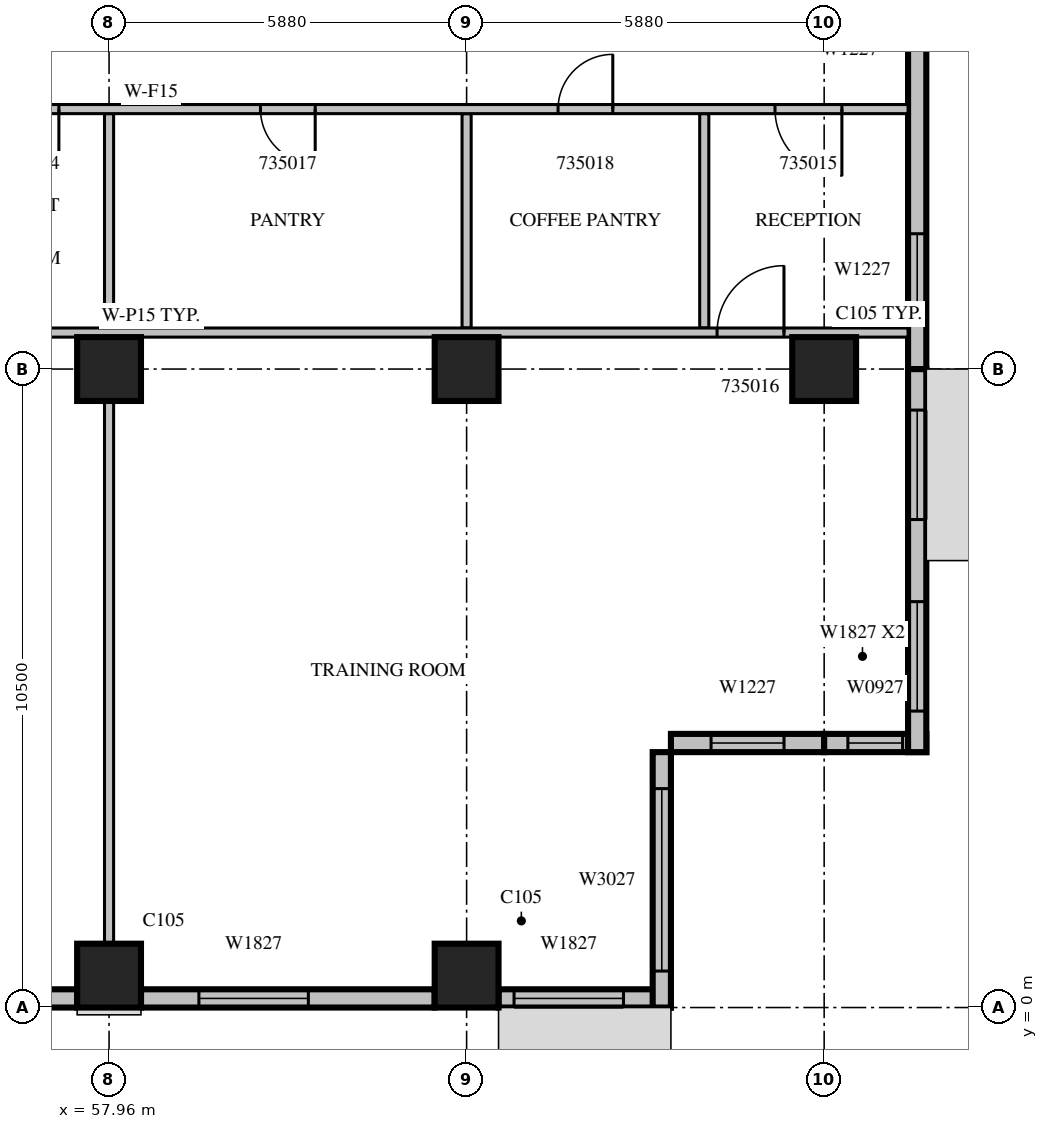
"""IFC4 building model, lengths in metres.
Left out: names, types, materials, properties, quantities, classifications, styles, units other than length and angle.
Written with IfcOpenShell. Run it as: python <this file> out.ifc"""

import sys

from ifc_helpers import new_model, si_unit, direction, frame, frame_2d, origin, origin_2d, place, context, subcontext, project, spatial, rectangle, extrude, source, transform, mapped, element, fill, save


model = new_model("IFC4")
c1 = context("Model", 3, precision=1e-05, world=origin(), true_north=direction((0.0, 1.0)))
c2 = subcontext(c1, "Body", "Model", "MODEL_VIEW")
j1 = project(units=[si_unit("LENGTHUNIT", "METRE"), si_unit("PLANEANGLEUNIT", "RADIAN")], contexts=[c1])
p1 = place(None, origin())
s1 = spatial("IfcSite", under=j1, at=p1, CompositionType="ELEMENT")
p2 = place(p1, origin())
s2 = spatial("IfcBuilding", under=s1, at=p2, CompositionType="ELEMENT")
p3 = place(p2, frame((0.0, 0.0, 158.1)))
s3 = spatial("IfcBuildingStorey", under=s2, at=p3, CompositionType="ELEMENT", Elevation=158.1)
m1 = source(origin(), c2, "Body", "SweptSolid", [
    extrude(rectangle(XDim=1.05, YDim=1.05, at=origin_2d()), origin(), (0.0, 0.0, 1.0), 4.2),
])
for number, where, z_axis, x_axis in (
    (1, (57.96, 0.525, 0.0), (0.0, 0.0, 1.0), (1.0, 0.0, 0.0)),
    (2, (63.84, 0.525, 0.0), (0.0, 0.0, 1.0), (1.0, 0.0, 0.0)),
    (3, (57.96, 10.5, 0.0), (0.0, 0.0, 1.0), (1.0, 0.0, 0.0)),
    (4, (63.84, 10.5, 0.0), (0.0, 0.0, 1.0), (1.0, 0.0, 0.0)),
    (5, (69.72, 10.5, 0.0), (0.0, 0.0, 1.0), (1.0, 0.0, 0.0)),
):
    element("IfcColumn", number, at=place(p3, frame(where, z_axis=z_axis, x_axis=x_axis)), inside=s3, PredefinedType="COLUMN", context=c2, shape_type="MappedRepresentation", body=[
        mapped(m1, transform((0.0, 0.0, 0.0), scale=1.0)),
    ])
m2 = source(origin(), c2, "Body", "SweptSolid", [
    extrude(rectangle(XDim=4.83, YDim=0.3, at=frame_2d((2.415, 0.0))), origin(), (0.0, 0.0, 1.0), 3.8),
])
p4 = place(p3, frame((52.605, 0.15, 0.0), z_axis=(0.0, 0.0, 1.0), x_axis=(1.0, 0.0, 0.0)))
e6 = element("IfcWall", 6, at=p4, inside=s3, PredefinedType="STANDARD", context=c2, shape_type="MappedRepresentation", body=[
    mapped(m2, transform((0.0, 0.0, 0.0), scale=1.0)),
])
m3 = source(origin(), c2, "Body", "SweptSolid", [
    extrude(rectangle(XDim=3.6, YDim=2.7, at=frame_2d((1.8, 1.35))), frame((0.0, 0.16, 0.0), z_axis=(0.0, -1.0, 0.0), x_axis=(1.0, 0.0, 0.0)), (0.0, 0.0, 1.0), 0.32),
])
p5 = place(p4, frame((0.615, 0.0, 0.6)))
e7 = element("IfcOpeningElement", 7, at=p5, cuts=e6, PredefinedType="OPENING", context=c2, shape_type="MappedRepresentation", body=[
    mapped(m3, transform((0.0, 0.0, 0.0), scale=1.0)),
])
p6 = place(p3, frame((58.485, 0.15, 0.0), z_axis=(0.0, 0.0, 1.0), x_axis=(1.0, 0.0, 0.0)))
e8 = element("IfcWall", 8, at=p6, inside=s3, PredefinedType="STANDARD", context=c2, shape_type="MappedRepresentation", body=[
    mapped(m2, transform((0.0, 0.0, 0.0), scale=1.0)),
])
m4 = source(origin(), c2, "Body", "SweptSolid", [
    extrude(rectangle(XDim=1.8, YDim=2.7, at=frame_2d((0.9, 1.35))), frame((0.0, 0.16, 0.0), z_axis=(0.0, -1.0, 0.0), x_axis=(1.0, 0.0, 0.0)), (0.0, 0.0, 1.0), 0.32),
])
p7 = place(p6, frame((0.953, 0.0, 0.6)))
e9 = element("IfcOpeningElement", 9, at=p7, cuts=e8, PredefinedType="OPENING", context=c2, shape_type="MappedRepresentation", body=[
    mapped(m4, transform((0.0, 0.0, 0.0), scale=1.0)),
])
m5 = source(origin(), c2, "Body", "SweptSolid", [
    extrude(rectangle(XDim=2.835, YDim=0.3, at=frame_2d((1.417, 0.0))), origin(), (0.0, 0.0, 1.0), 3.8),
])
p8 = place(p3, frame((64.365, 0.15, 0.0), z_axis=(0.0, 0.0, 1.0), x_axis=(1.0, 0.0, 0.0)))
e10 = element("IfcWall", 10, at=p8, inside=s3, PredefinedType="STANDARD", context=c2, shape_type="MappedRepresentation", body=[
    mapped(m5, transform((0.0, 0.0, 0.0), scale=1.0)),
])
p9 = place(p8, frame((0.255, 0.0, 0.6)))
e11 = element("IfcOpeningElement", 11, at=p9, cuts=e10, PredefinedType="OPENING", context=c2, shape_type="MappedRepresentation", body=[
    mapped(m4, transform((0.0, 0.0, 0.0), scale=1.0)),
])
m6 = source(origin(), c2, "Body", "SweptSolid", [
    extrude(rectangle(XDim=4.2, YDim=0.3, at=frame_2d((2.1, 0.0))), origin(), (0.0, 0.0, 1.0), 3.8),
])
p10 = place(p3, frame((67.05, 0.0, 0.0), z_axis=(0.0, 0.0, 1.0), x_axis=(0.0, 1.0, 0.0)))
e12 = element("IfcWall", 12, at=p10, inside=s3, PredefinedType="STANDARD", context=c2, shape_type="MappedRepresentation", body=[
    mapped(m6, transform((0.0, 0.0, 0.0), scale=1.0)),
])
m7 = source(origin(), c2, "Body", "SweptSolid", [
    extrude(rectangle(XDim=3.0, YDim=2.7, at=frame_2d((1.5, 1.35))), frame((0.0, 0.16, 0.0), z_axis=(0.0, -1.0, 0.0), x_axis=(1.0, 0.0, 0.0)), (0.0, 0.0, 1.0), 0.32),
])
p11 = place(p10, frame((0.6, 0.0, 0.6)))
e13 = element("IfcOpeningElement", 13, at=p11, cuts=e12, PredefinedType="OPENING", context=c2, shape_type="MappedRepresentation", body=[
    mapped(m7, transform((0.0, 0.0, 0.0), scale=1.0)),
])
m8 = source(origin(), c2, "Body", "SweptSolid", [
    extrude(rectangle(XDim=2.52, YDim=0.3, at=frame_2d((1.26, 0.0))), origin(), (0.0, 0.0, 1.0), 3.8),
])
p12 = place(p3, frame((67.2, 4.35, 0.0), z_axis=(0.0, 0.0, 1.0), x_axis=(1.0, 0.0, 0.0)))
e14 = element("IfcWall", 14, at=p12, inside=s3, PredefinedType="STANDARD", context=c2, shape_type="MappedRepresentation", body=[
    mapped(m8, transform((0.0, 0.0, 0.0), scale=1.0)),
])
m9 = source(origin(), c2, "Body", "SweptSolid", [
    extrude(rectangle(XDim=1.2, YDim=2.7, at=frame_2d((0.6, 1.35))), frame((0.0, 0.16, 0.0), z_axis=(0.0, -1.0, 0.0), x_axis=(1.0, 0.0, 0.0)), (0.0, 0.0, 1.0), 0.32),
])
p13 = place(p12, frame((0.66, 0.0, 0.6)))
e15 = element("IfcOpeningElement", 15, at=p13, cuts=e14, PredefinedType="OPENING", context=c2, shape_type="MappedRepresentation", body=[
    mapped(m9, transform((0.0, 0.0, 0.0), scale=1.0)),
])
m10 = source(origin(), c2, "Body", "SweptSolid", [
    extrude(rectangle(XDim=1.68, YDim=0.3, at=frame_2d((0.84, 0.0))), origin(), (0.0, 0.0, 1.0), 3.8),
])
p14 = place(p3, frame((69.72, 4.35, 0.0), z_axis=(0.0, 0.0, 1.0), x_axis=(1.0, 0.0, 0.0)))
e16 = element("IfcWall", 16, at=p14, inside=s3, PredefinedType="STANDARD", context=c2, shape_type="MappedRepresentation", body=[
    mapped(m10, transform((0.0, 0.0, 0.0), scale=1.0)),
])
m11 = source(origin(), c2, "Body", "SweptSolid", [
    extrude(rectangle(XDim=0.9, YDim=2.7, at=frame_2d((0.45, 1.35))), frame((0.0, 0.16, 0.0), z_axis=(0.0, -1.0, 0.0), x_axis=(1.0, 0.0, 0.0)), (0.0, 0.0, 1.0), 0.32),
])
p15 = place(p14, frame((0.39, 0.0, 0.6)))
e17 = element("IfcOpeningElement", 17, at=p15, cuts=e16, PredefinedType="OPENING", context=c2, shape_type="MappedRepresentation", body=[
    mapped(m11, transform((0.0, 0.0, 0.0), scale=1.0)),
])
m12 = source(origin(), c2, "Body", "SweptSolid", [
    extrude(rectangle(XDim=6.3, YDim=0.3, at=frame_2d((3.15, 0.0))), origin(), (0.0, 0.0, 1.0), 3.8),
])
p16 = place(p3, frame((71.25, 4.2, 0.0), z_axis=(0.0, 0.0, 1.0), x_axis=(0.0, 1.0, 0.0)))
e18 = element("IfcWall", 18, at=p16, inside=s3, PredefinedType="STANDARD", context=c2, shape_type="MappedRepresentation", body=[
    mapped(m12, transform((0.0, 0.0, 0.0), scale=1.0)),
])
p17 = place(p16, frame((0.675, 0.0, 0.6)))
e19 = element("IfcOpeningElement", 19, at=p17, cuts=e18, PredefinedType="OPENING", context=c2, shape_type="MappedRepresentation", body=[
    mapped(m4, transform((0.0, 0.0, 0.0), scale=1.0)),
])
p18 = place(p16, frame((3.825, 0.0, 0.6)))
e20 = element("IfcOpeningElement", 20, at=p18, cuts=e18, PredefinedType="OPENING", context=c2, shape_type="MappedRepresentation", body=[
    mapped(m4, transform((0.0, 0.0, 0.0), scale=1.0)),
])
p19 = place(p3, frame((71.25, 10.5, 0.0), z_axis=(0.0, 0.0, 1.0), x_axis=(0.0, 1.0, 0.0)))
e21 = element("IfcWall", 21, at=p19, inside=s3, PredefinedType="STANDARD", context=c2, shape_type="MappedRepresentation", body=[
    mapped(m12, transform((0.0, 0.0, 0.0), scale=1.0)),
])
p20 = place(p19, frame((1.025, 0.0, 0.6)))
e22 = element("IfcOpeningElement", 22, at=p20, cuts=e21, PredefinedType="OPENING", context=c2, shape_type="MappedRepresentation", body=[
    mapped(m9, transform((0.0, 0.0, 0.0), scale=1.0)),
])
m13 = source(origin(), c2, "Body", "SweptSolid", [
    extrude(rectangle(XDim=3.525, YDim=0.15, at=frame_2d((1.762, 0.0))), origin(), (0.0, 0.0, 1.0), 3.8),
])
for number, where, z_axis, x_axis in (
    (23, (63.84, 11.175, 0.0), (0.0, 0.0, 1.0), (0.0, 1.0, 0.0)),
    (24, (67.748, 11.175, 0.0), (0.0, 0.0, 1.0), (0.0, 1.0, 0.0)),
):
    element("IfcWall", number, at=place(p3, frame(where, z_axis=z_axis, x_axis=x_axis)), inside=s3, PredefinedType="PARTITIONING", context=c2, shape_type="MappedRepresentation", body=[
        mapped(m13, transform((0.0, 0.0, 0.0), scale=1.0)),
    ])
m14 = source(origin(), c2, "Body", "SweptSolid", [
    extrude(rectangle(XDim=8.927, YDim=0.15, at=frame_2d((4.463, 0.0))), origin(), (0.0, 0.0, 1.0), 3.8),
])
p21 = place(p3, frame((57.96, 1.049, 0.0), z_axis=(0.0, 0.0, 1.0), x_axis=(0.0, 1.0, 0.0)))
e25 = element("IfcWall", 25, at=p21, inside=s3, PredefinedType="PARTITIONING", context=c2, shape_type="MappedRepresentation", body=[
    mapped(m14, transform((0.0, 0.0, 0.0), scale=1.0)),
])
p22 = place(p3, frame((57.96, 11.175, 0.0), z_axis=(0.0, 0.0, 1.0), x_axis=(0.0, 1.0, 0.0)))
e26 = element("IfcWall", 26, at=p22, inside=s3, PredefinedType="PARTITIONING", context=c2, shape_type="MappedRepresentation", body=[
    mapped(m13, transform((0.0, 0.0, 0.0), scale=1.0)),
])
m15 = source(origin(), c2, "Body", "SweptSolid", [
    extrude(rectangle(XDim=24.9, YDim=0.15, at=frame_2d((12.45, 0.0))), origin(), (0.0, 0.0, 1.0), 3.8),
])
p23 = place(p3, frame((71.1, 11.1, 0.0), z_axis=(0.0, 0.0, 1.0), x_axis=(-1.0, 0.0, 0.0)))
e27 = element("IfcWall", 27, at=p23, inside=s3, PredefinedType="PARTITIONING", context=c2, shape_type="MappedRepresentation", body=[
    mapped(m15, transform((0.0, 0.0, 0.0), scale=1.0)),
])
m16 = source(origin(), c2, "Body", "SweptSolid", [
    extrude(rectangle(XDim=1.1, YDim=2.1, at=frame_2d((0.55, 1.05))), frame((0.0, 0.085, 0.0), z_axis=(0.0, -1.0, 0.0), x_axis=(1.0, 0.0, 0.0)), (0.0, 0.0, 1.0), 0.17),
])
p24 = place(p23, frame((22.451, 0.0, 0.0)))
e28 = element("IfcOpeningElement", 28, at=p24, cuts=e27, PredefinedType="OPENING", context=c2, shape_type="MappedRepresentation", body=[
    mapped(m16, transform((0.0, 0.0, 0.0), scale=1.0)),
])
p25 = place(p23, frame((2.041, 0.0, 0.0)))
e29 = element("IfcOpeningElement", 29, at=p25, cuts=e27, PredefinedType="OPENING", context=c2, shape_type="MappedRepresentation", body=[
    mapped(m16, transform((0.0, 0.0, 0.0), scale=1.0)),
])
p26 = place(p3, frame((71.1, 14.775, 0.0), z_axis=(0.0, 0.0, 1.0), x_axis=(-1.0, 0.0, 0.0)))
e30 = element("IfcWall", 30, at=p26, inside=s3, PredefinedType="PARTITIONING", context=c2, shape_type="MappedRepresentation", body=[
    mapped(m15, transform((0.0, 0.0, 0.0), scale=1.0)),
])
p27 = place(p26, frame((22.726, 0.0, 0.0)))
e31 = element("IfcOpeningElement", 31, at=p27, cuts=e30, PredefinedType="OPENING", context=c2, shape_type="MappedRepresentation", body=[
    mapped(m16, transform((0.0, 0.0, 0.0), scale=1.0)),
])
m17 = source(origin(), c2, "Body", "SweptSolid", [
    extrude(rectangle(XDim=0.9, YDim=2.1, at=frame_2d((0.45, 1.05))), frame((0.0, 0.085, 0.0), z_axis=(0.0, -1.0, 0.0), x_axis=(1.0, 0.0, 0.0)), (0.0, 0.0, 1.0), 0.17),
])
p28 = place(p26, frame((19.886, 0.0, 0.0)))
e32 = element("IfcOpeningElement", 32, at=p28, cuts=e30, PredefinedType="OPENING", context=c2, shape_type="MappedRepresentation", body=[
    mapped(m17, transform((0.0, 0.0, 0.0), scale=1.0)),
])
p29 = place(p26, frame((16.905, 0.0, 0.0)))
e33 = element("IfcOpeningElement", 33, at=p29, cuts=e30, PredefinedType="OPENING", context=c2, shape_type="MappedRepresentation", body=[
    mapped(m17, transform((0.0, 0.0, 0.0), scale=1.0)),
])
p30 = place(p26, frame((13.965, 0.0, 0.0)))
e34 = element("IfcOpeningElement", 34, at=p30, cuts=e30, PredefinedType="OPENING", context=c2, shape_type="MappedRepresentation", body=[
    mapped(m17, transform((0.0, 0.0, 0.0), scale=1.0)),
])
p31 = place(p26, frame((1.088, 0.0, 0.0)))
e35 = element("IfcOpeningElement", 35, at=p31, cuts=e30, PredefinedType="OPENING", context=c2, shape_type="MappedRepresentation", body=[
    mapped(m16, transform((0.0, 0.0, 0.0), scale=1.0)),
])
p32 = place(p26, frame((9.75, 0.0, 0.0)))
e36 = element("IfcOpeningElement", 36, at=p32, cuts=e30, PredefinedType="OPENING", context=c2, shape_type="MappedRepresentation", body=[
    mapped(m17, transform((0.0, 0.0, 0.0), scale=1.0)),
])
p33 = place(p26, frame((4.856, 0.0, 0.0)))
e37 = element("IfcOpeningElement", 37, at=p33, cuts=e30, PredefinedType="OPENING", context=c2, shape_type="MappedRepresentation", body=[
    mapped(m17, transform((0.0, 0.0, 0.0), scale=1.0)),
])
m18 = source(origin(), c2, "Body", "SweptSolid", [
    extrude(rectangle(XDim=1.8, YDim=2.7, at=frame_2d((0.9, 1.35))), frame((0.0, 0.03, 0.0), z_axis=(0.0, -1.0, 0.0), x_axis=(1.0, 0.0, 0.0)), (0.0, 0.0, 1.0), 0.06),
])
p34 = place(p7, origin())
e38 = element("IfcWindow", 38, at=p34, inside=s3, PartitioningType="SINGLE_PANEL", PredefinedType="WINDOW", context=c2, shape_type="MappedRepresentation", body=[
    mapped(m18, transform((0.0, 0.0, 0.0), scale=1.0)),
])
fill(e9, e38)
p35 = place(p9, origin())
e39 = element("IfcWindow", 39, at=p35, inside=s3, PartitioningType="SINGLE_PANEL", PredefinedType="WINDOW", context=c2, shape_type="MappedRepresentation", body=[
    mapped(m18, transform((0.0, 0.0, 0.0), scale=1.0)),
])
fill(e11, e39)
m19 = source(origin(), c2, "Body", "SweptSolid", [
    extrude(rectangle(XDim=3.0, YDim=2.7, at=frame_2d((1.5, 1.35))), frame((0.0, 0.03, 0.0), z_axis=(0.0, -1.0, 0.0), x_axis=(1.0, 0.0, 0.0)), (0.0, 0.0, 1.0), 0.06),
])
p36 = place(p11, origin())
e40 = element("IfcWindow", 40, at=p36, inside=s3, PartitioningType="SINGLE_PANEL", PredefinedType="WINDOW", context=c2, shape_type="MappedRepresentation", body=[
    mapped(m19, transform((0.0, 0.0, 0.0), scale=1.0)),
])
fill(e13, e40)
m20 = source(origin(), c2, "Body", "SweptSolid", [
    extrude(rectangle(XDim=1.2, YDim=2.7, at=frame_2d((0.6, 1.35))), frame((0.0, 0.03, 0.0), z_axis=(0.0, -1.0, 0.0), x_axis=(1.0, 0.0, 0.0)), (0.0, 0.0, 1.0), 0.06),
])
p37 = place(p13, origin())
e41 = element("IfcWindow", 41, at=p37, inside=s3, PartitioningType="SINGLE_PANEL", PredefinedType="WINDOW", context=c2, shape_type="MappedRepresentation", body=[
    mapped(m20, transform((0.0, 0.0, 0.0), scale=1.0)),
])
fill(e15, e41)
m21 = source(origin(), c2, "Body", "SweptSolid", [
    extrude(rectangle(XDim=0.9, YDim=2.7, at=frame_2d((0.45, 1.35))), frame((0.0, 0.03, 0.0), z_axis=(0.0, -1.0, 0.0), x_axis=(1.0, 0.0, 0.0)), (0.0, 0.0, 1.0), 0.06),
])
p38 = place(p15, origin())
e42 = element("IfcWindow", 42, at=p38, inside=s3, PartitioningType="SINGLE_PANEL", PredefinedType="WINDOW", context=c2, shape_type="MappedRepresentation", body=[
    mapped(m21, transform((0.0, 0.0, 0.0), scale=1.0)),
])
fill(e17, e42)
p39 = place(p17, origin())
e43 = element("IfcWindow", 43, at=p39, inside=s3, PartitioningType="SINGLE_PANEL", PredefinedType="WINDOW", context=c2, shape_type="MappedRepresentation", body=[
    mapped(m18, transform((0.0, 0.0, 0.0), scale=1.0)),
])
fill(e19, e43)
p40 = place(p18, origin())
e44 = element("IfcWindow", 44, at=p40, inside=s3, PartitioningType="SINGLE_PANEL", PredefinedType="WINDOW", context=c2, shape_type="MappedRepresentation", body=[
    mapped(m18, transform((0.0, 0.0, 0.0), scale=1.0)),
])
fill(e20, e44)
p41 = place(p20, origin())
e45 = element("IfcWindow", 45, at=p41, inside=s3, PartitioningType="SINGLE_PANEL", PredefinedType="WINDOW", context=c2, shape_type="MappedRepresentation", body=[
    mapped(m20, transform((0.0, 0.0, 0.0), scale=1.0)),
])
fill(e22, e45)
m22 = source(origin(), c2, "Body", "SweptSolid", [
    extrude(rectangle(XDim=0.9, YDim=2.1, at=frame_2d((0.45, 1.05))), frame((0.0, 0.025, 0.0), z_axis=(0.0, -1.0, 0.0), x_axis=(1.0, 0.0, 0.0)), (0.0, 0.0, 1.0), 0.05),
])
p42 = place(p30, origin())
e46 = element("IfcDoor", 46, at=p42, inside=s3, OperationType="SINGLE_SWING_LEFT", PredefinedType="DOOR", context=c2, shape_type="MappedRepresentation", body=[
    mapped(m22, transform((0.0, 0.0, 0.0), scale=1.0)),
])
fill(e34, e46)
m23 = source(origin(), c2, "Body", "SweptSolid", [
    extrude(rectangle(XDim=1.1, YDim=2.1, at=frame_2d((0.55, 1.05))), frame((0.0, 0.025, 0.0), z_axis=(0.0, -1.0, 0.0), x_axis=(1.0, 0.0, 0.0)), (0.0, 0.0, 1.0), 0.05),
])
p43 = place(p31, origin())
e47 = element("IfcDoor", 47, at=p43, inside=s3, OperationType="SINGLE_SWING_LEFT", PredefinedType="DOOR", context=c2, shape_type="MappedRepresentation", body=[
    mapped(m23, transform((0.0, 0.0, 0.0), scale=1.0)),
])
fill(e35, e47)
p44 = place(p25, origin())
e48 = element("IfcDoor", 48, at=p44, inside=s3, OperationType="SINGLE_SWING_RIGHT", PredefinedType="DOOR", context=c2, shape_type="MappedRepresentation", body=[
    mapped(m23, transform((0.0, 0.0, 0.0), scale=1.0)),
])
fill(e29, e48)
p45 = place(p32, origin())
e49 = element("IfcDoor", 49, at=p45, inside=s3, OperationType="SINGLE_SWING_LEFT", PredefinedType="DOOR", context=c2, shape_type="MappedRepresentation", body=[
    mapped(m22, transform((0.0, 0.0, 0.0), scale=1.0)),
])
fill(e36, e49)
p46 = place(p33, origin())
e50 = element("IfcDoor", 50, at=p46, inside=s3, OperationType="SINGLE_SWING_RIGHT", PredefinedType="DOOR", context=c2, shape_type="MappedRepresentation", body=[
    mapped(m22, transform((0.0, 0.0, 0.0), scale=1.0)),
])
fill(e37, e50)
save(model, sys.argv[1])
